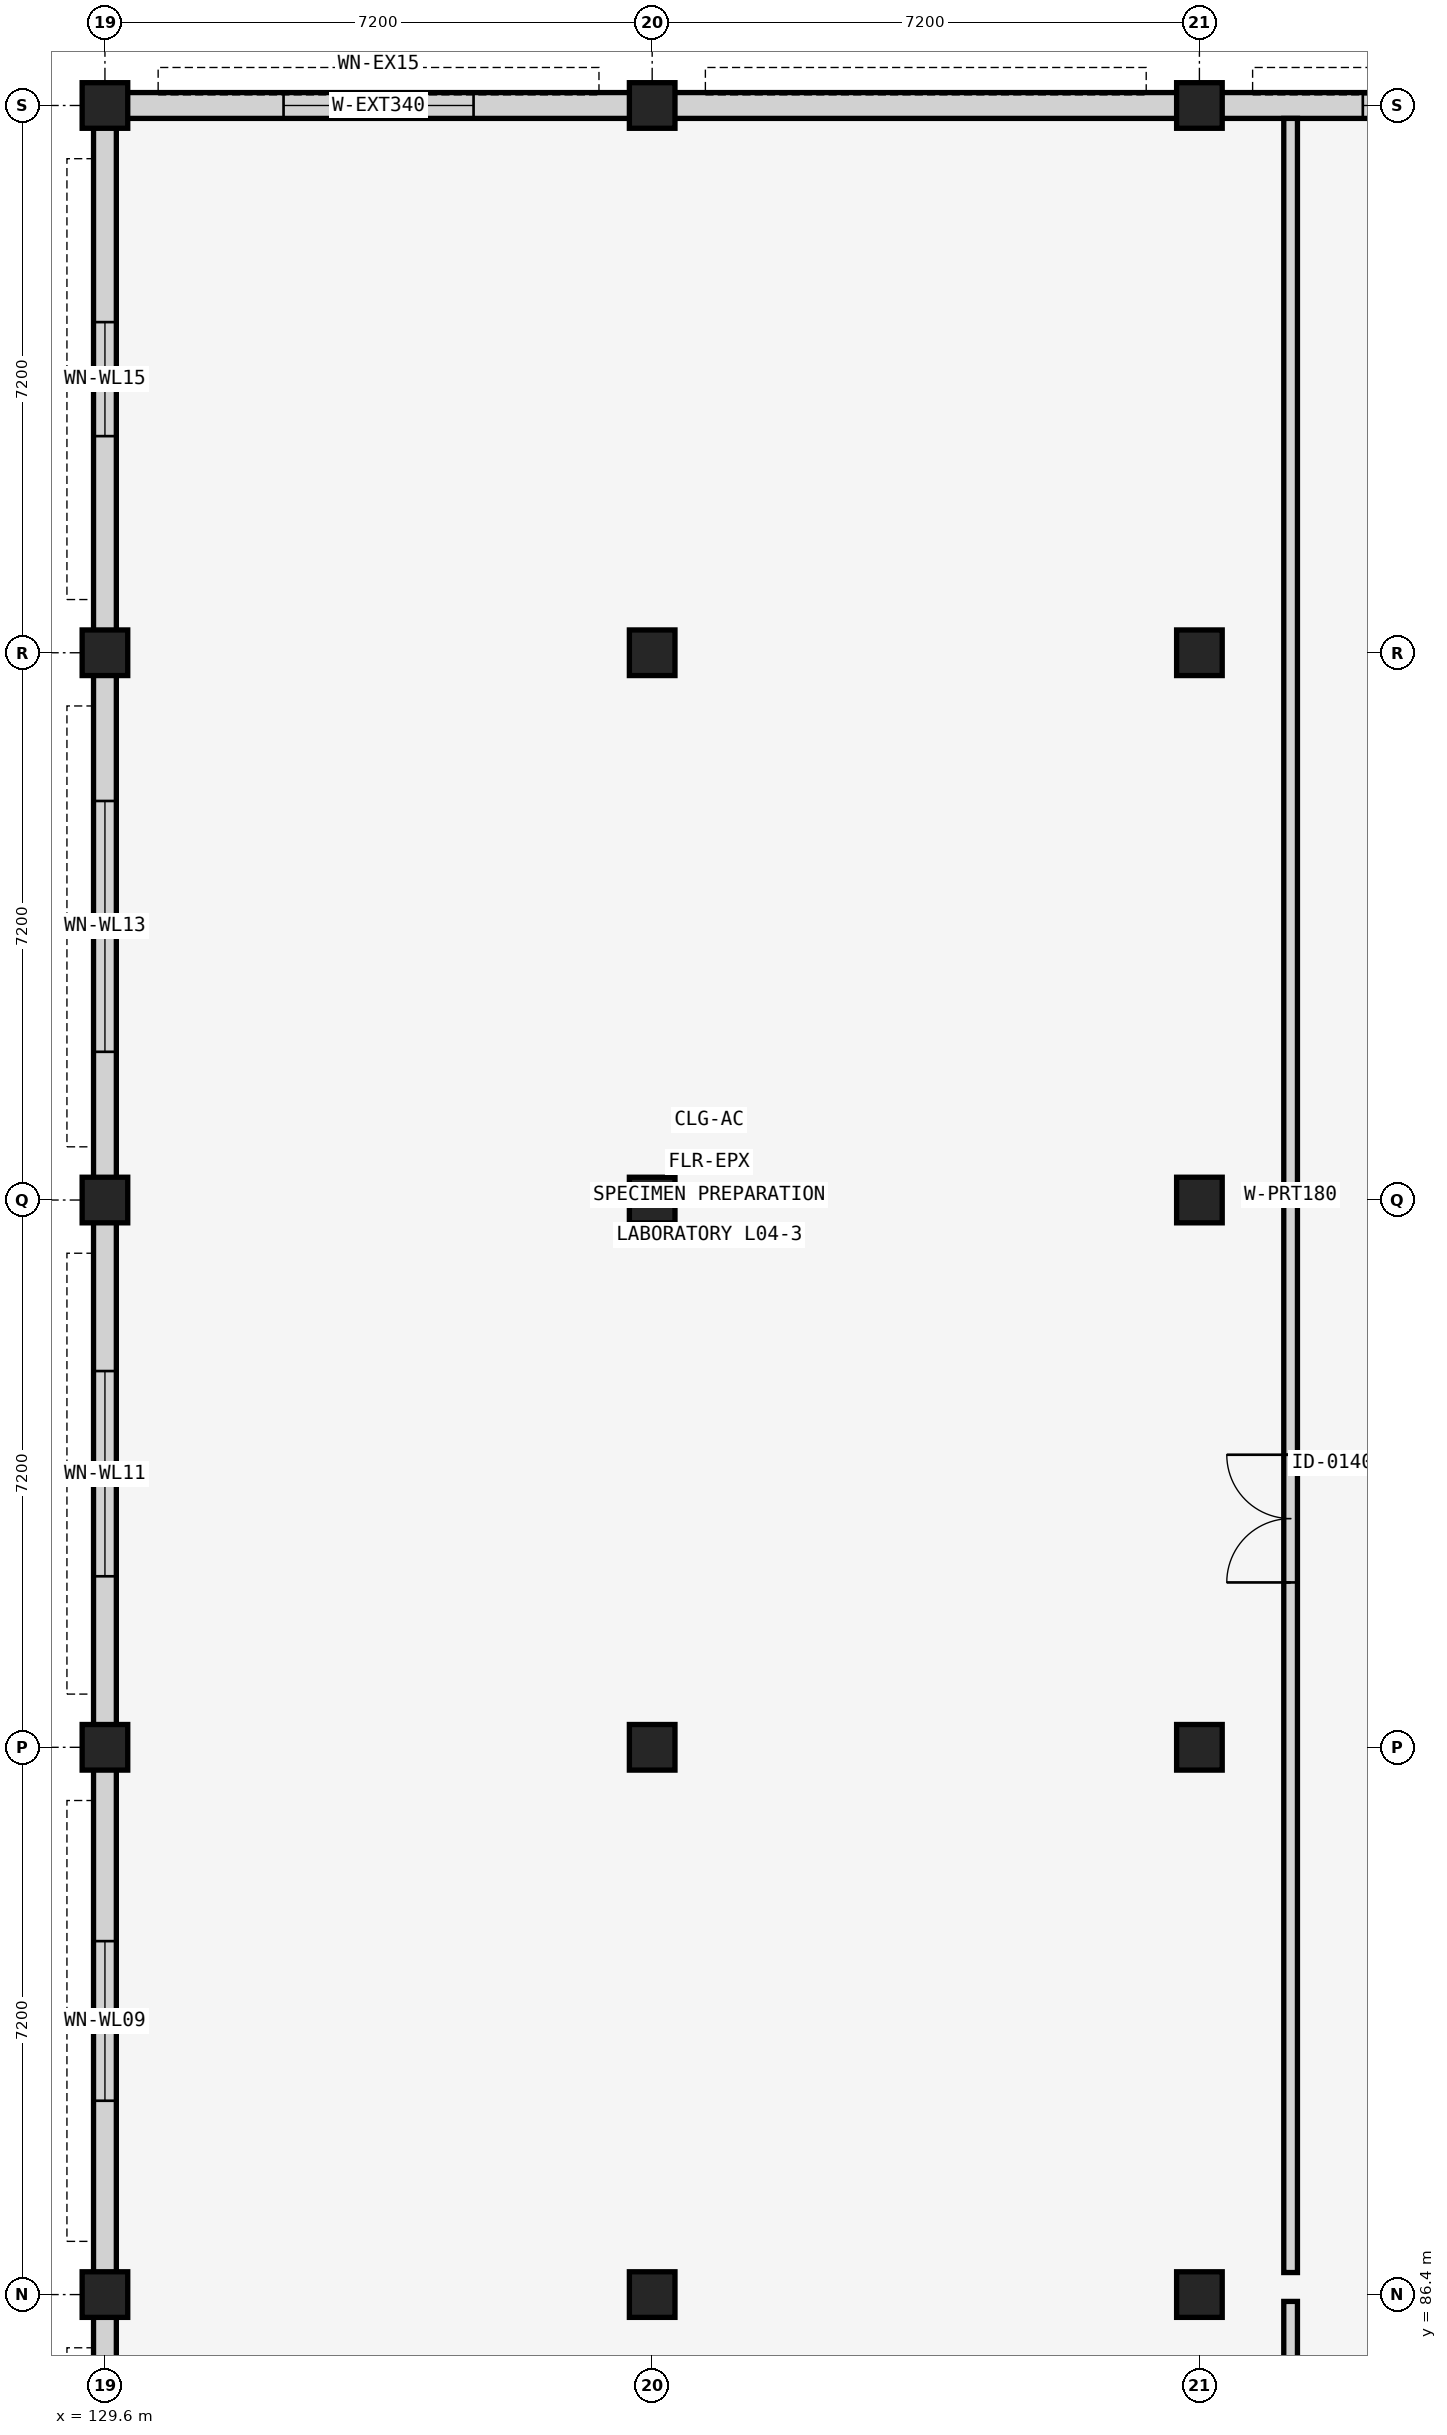
"""IFC4 building model, lengths in metres.
Left out: names, types, materials, properties, quantities, classifications, styles, units other than length and angle.
Written with IfcOpenShell. Run it as: python <this file> out.ifc"""

import sys

from ifc_helpers import new_model, si_unit, direction, frame, frame_2d, origin, origin_2d, place, context, subcontext, project, spatial, rectangle, extrude, element, fill, save


model = new_model("IFC4")
c1 = context("Model", 3, precision=1e-05, world=origin(), true_north=direction((0.0, 1.0)))
c2 = subcontext(c1, "Body", "Model", "MODEL_VIEW")
j1 = project(units=[si_unit("LENGTHUNIT", "METRE"), si_unit("PLANEANGLEUNIT", "RADIAN")], contexts=[c1])
p1 = place(None, origin())
s1 = spatial("IfcSite", under=j1, at=p1, CompositionType="ELEMENT")
p2 = place(p1, origin())
s2 = spatial("IfcBuilding", under=s1, at=p2, CompositionType="ELEMENT")
p3 = place(p2, frame((0.0, 0.0, 17.28)))
s3 = spatial("IfcBuildingStorey", under=s2, at=p3, CompositionType="ELEMENT", Elevation=17.28)
for number, where, z_axis, x_axis in (
    (1, (129.6, 86.4, 0.0), (0.0, 0.0, 1.0), (1.0, 0.0, 0.0)),
    (2, (129.6, 93.6, 0.0), (0.0, 0.0, 1.0), (1.0, 0.0, 0.0)),
    (3, (129.6, 100.8, 0.0), (0.0, 0.0, 1.0), (1.0, 0.0, 0.0)),
    (4, (129.6, 108.0, 0.0), (0.0, 0.0, 1.0), (1.0, 0.0, 0.0)),
    (5, (129.6, 115.2, 0.0), (0.0, 0.0, 1.0), (1.0, 0.0, 0.0)),
    (6, (136.8, 86.4, 0.0), (0.0, 0.0, 1.0), (1.0, 0.0, 0.0)),
    (7, (136.8, 93.6, 0.0), (0.0, 0.0, 1.0), (1.0, 0.0, 0.0)),
    (8, (136.8, 100.8, 0.0), (0.0, 0.0, 1.0), (1.0, 0.0, 0.0)),
    (9, (136.8, 108.0, 0.0), (0.0, 0.0, 1.0), (1.0, 0.0, 0.0)),
    (10, (136.8, 115.2, 0.0), (0.0, 0.0, 1.0), (1.0, 0.0, 0.0)),
    (11, (144.0, 86.4, 0.0), (0.0, 0.0, 1.0), (1.0, 0.0, 0.0)),
    (12, (144.0, 93.6, 0.0), (0.0, 0.0, 1.0), (1.0, 0.0, 0.0)),
    (13, (144.0, 100.8, 0.0), (0.0, 0.0, 1.0), (1.0, 0.0, 0.0)),
    (14, (144.0, 108.0, 0.0), (0.0, 0.0, 1.0), (1.0, 0.0, 0.0)),
    (15, (144.0, 115.2, 0.0), (0.0, 0.0, 1.0), (1.0, 0.0, 0.0)),
):
    element("IfcColumn", number, at=place(p3, frame(where, z_axis=z_axis, x_axis=x_axis)), inside=s3, PredefinedType="COLUMN", context=c2, shape_type="SweptSolid", body=[
        extrude(rectangle(XDim=0.6, YDim=0.6, at=origin_2d()), origin(), (0.0, 0.0, 1.0), 4.16),
    ])
p4 = place(p3, frame((129.89, 115.2, 0.0), z_axis=(0.0, 0.0, 1.0), x_axis=(1.0, 0.0, 0.0)))
e16 = element("IfcWall", 16, at=p4, inside=s3, PredefinedType="SOLIDWALL", context=c2, shape_type="SweptSolid", body=[
    extrude(rectangle(XDim=6.62, YDim=0.34, at=frame_2d((3.31, 0.0))), origin(), (0.0, 0.0, 1.0), 3.21),
])
p5 = place(p4, frame((2.06, 0.0, 0.95)))
e17 = element("IfcOpeningElement", 17, at=p5, cuts=e16, PredefinedType="OPENING", context=c2, shape_type="SweptSolid", body=[
    extrude(rectangle(XDim=2.5, YDim=1.6, at=frame_2d((1.25, 0.8))), frame((0.0, 0.18, 0.0), z_axis=(0.0, -1.0, 0.0), x_axis=(1.0, 0.0, 0.0)), (0.0, 0.0, 1.0), 0.36),
])
p6 = place(p3, frame((137.09, 115.2, 0.0), z_axis=(0.0, 0.0, 1.0), x_axis=(1.0, 0.0, 0.0)))
e18 = element("IfcWall", 18, at=p6, inside=s3, PredefinedType="SOLIDWALL", context=c2, shape_type="SweptSolid", body=[
    extrude(rectangle(XDim=6.62, YDim=0.34, at=frame_2d((3.31, 0.0))), origin(), (0.0, 0.0, 1.0), 3.21),
])
p7 = place(p3, frame((144.29, 115.2, 0.0), z_axis=(0.0, 0.0, 1.0), x_axis=(1.0, 0.0, 0.0)))
e19 = element("IfcWall", 19, at=p7, inside=s3, PredefinedType="SOLIDWALL", context=c2, shape_type="SweptSolid", body=[
    extrude(rectangle(XDim=6.62, YDim=0.34, at=frame_2d((3.31, 0.0))), origin(), (0.0, 0.0, 1.0), 3.21),
])
p8 = place(p7, frame((1.86, 0.0, 0.95)))
e20 = element("IfcOpeningElement", 20, at=p8, cuts=e19, PredefinedType="OPENING", context=c2, shape_type="SweptSolid", body=[
    extrude(rectangle(XDim=2.9, YDim=1.75, at=frame_2d((1.45, 0.875))), frame((0.0, 0.18, 0.0), z_axis=(0.0, -1.0, 0.0), x_axis=(1.0, 0.0, 0.0)), (0.0, 0.0, 1.0), 0.36),
])
p9 = place(p3, frame((129.6, 79.49, 0.0), z_axis=(0.0, 0.0, 1.0), x_axis=(0.0, 1.0, 0.0)))
e21 = element("IfcWall", 21, at=p9, inside=s3, PredefinedType="SOLIDWALL", context=c2, shape_type="SweptSolid", body=[
    extrude(rectangle(XDim=6.62, YDim=0.3, at=frame_2d((3.31, 0.0))), origin(), (0.0, 0.0, 1.0), 3.16),
])
p10 = place(p9, frame((1.51, 0.0, 0.9)))
e22 = element("IfcOpeningElement", 22, at=p10, cuts=e21, PredefinedType="OPENING", context=c2, shape_type="SweptSolid", body=[
    extrude(rectangle(XDim=3.6, YDim=2.1, at=frame_2d((1.8, 1.05))), frame((0.0, 0.16, 0.0), z_axis=(0.0, -1.0, 0.0), x_axis=(1.0, 0.0, 0.0)), (0.0, 0.0, 1.0), 0.32),
])
p11 = place(p3, frame((129.6, 86.69, 0.0), z_axis=(0.0, 0.0, 1.0), x_axis=(0.0, 1.0, 0.0)))
e23 = element("IfcWall", 23, at=p11, inside=s3, PredefinedType="SOLIDWALL", context=c2, shape_type="SweptSolid", body=[
    extrude(rectangle(XDim=6.62, YDim=0.3, at=frame_2d((3.31, 0.0))), origin(), (0.0, 0.0, 1.0), 3.16),
])
p12 = place(p11, frame((2.26, 0.0, 0.95)))
e24 = element("IfcOpeningElement", 24, at=p12, cuts=e23, PredefinedType="OPENING", context=c2, shape_type="SweptSolid", body=[
    extrude(rectangle(XDim=2.1, YDim=1.8, at=frame_2d((1.05, 0.9))), frame((0.0, 0.16, 0.0), z_axis=(0.0, -1.0, 0.0), x_axis=(1.0, 0.0, 0.0)), (0.0, 0.0, 1.0), 0.32),
])
p13 = place(p3, frame((129.6, 93.89, 0.0), z_axis=(0.0, 0.0, 1.0), x_axis=(0.0, 1.0, 0.0)))
e25 = element("IfcWall", 25, at=p13, inside=s3, PredefinedType="SOLIDWALL", context=c2, shape_type="SweptSolid", body=[
    extrude(rectangle(XDim=6.62, YDim=0.3, at=frame_2d((3.31, 0.0))), origin(), (0.0, 0.0, 1.0), 3.16),
])
p14 = place(p13, frame((1.96, 0.0, 0.95)))
e26 = element("IfcOpeningElement", 26, at=p14, cuts=e25, PredefinedType="OPENING", context=c2, shape_type="SweptSolid", body=[
    extrude(rectangle(XDim=2.7, YDim=1.8, at=frame_2d((1.35, 0.9))), frame((0.0, 0.16, 0.0), z_axis=(0.0, -1.0, 0.0), x_axis=(1.0, 0.0, 0.0)), (0.0, 0.0, 1.0), 0.32),
])
p15 = place(p3, frame((129.6, 101.09, 0.0), z_axis=(0.0, 0.0, 1.0), x_axis=(0.0, 1.0, 0.0)))
e27 = element("IfcWall", 27, at=p15, inside=s3, PredefinedType="SOLIDWALL", context=c2, shape_type="SweptSolid", body=[
    extrude(rectangle(XDim=6.62, YDim=0.3, at=frame_2d((3.31, 0.0))), origin(), (0.0, 0.0, 1.0), 3.16),
])
p16 = place(p15, frame((1.66, 0.0, 0.95)))
e28 = element("IfcOpeningElement", 28, at=p16, cuts=e27, PredefinedType="OPENING", context=c2, shape_type="SweptSolid", body=[
    extrude(rectangle(XDim=3.3, YDim=1.8, at=frame_2d((1.65, 0.9))), frame((0.0, 0.16, 0.0), z_axis=(0.0, -1.0, 0.0), x_axis=(1.0, 0.0, 0.0)), (0.0, 0.0, 1.0), 0.32),
])
p17 = place(p3, frame((129.6, 108.29, 0.0), z_axis=(0.0, 0.0, 1.0), x_axis=(0.0, 1.0, 0.0)))
e29 = element("IfcWall", 29, at=p17, inside=s3, PredefinedType="SOLIDWALL", context=c2, shape_type="SweptSolid", body=[
    extrude(rectangle(XDim=6.62, YDim=0.3, at=frame_2d((3.31, 0.0))), origin(), (0.0, 0.0, 1.0), 3.16),
])
p18 = place(p17, frame((2.56, 0.0, 0.95)))
e30 = element("IfcOpeningElement", 30, at=p18, cuts=e29, PredefinedType="OPENING", context=c2, shape_type="SweptSolid", body=[
    extrude(rectangle(XDim=1.5, YDim=1.8, at=frame_2d((0.75, 0.9))), frame((0.0, 0.16, 0.0), z_axis=(0.0, -1.0, 0.0), x_axis=(1.0, 0.0, 0.0)), (0.0, 0.0, 1.0), 0.32),
])
p19 = place(p3, frame((145.2, 57.89, 0.0), z_axis=(0.0, 0.0, 1.0), x_axis=(0.0, 1.0, 0.0)))
e31 = element("IfcWall", 31, at=p19, inside=s3, PredefinedType="PARTITIONING", context=c2, shape_type="SweptSolid", body=[
    extrude(rectangle(XDim=28.42, YDim=0.18, at=frame_2d((14.21, 0.0))), origin(), (0.0, 0.0, 1.0), 3.16),
])
p20 = place(p19, frame((9.132, 0.0, 0.0)))
e32 = element("IfcOpeningElement", 32, at=p20, cuts=e31, PredefinedType="OPENING", context=c2, shape_type="SweptSolid", body=[
    extrude(rectangle(XDim=1.63, YDim=2.22, at=frame_2d((0.815, 1.11))), frame((0.0, 0.1, 0.0), z_axis=(0.0, -1.0, 0.0), x_axis=(1.0, 0.0, 0.0)), (0.0, 0.0, 1.0), 0.2),
])
p21 = place(p3, frame((145.2, 86.69, 0.0), z_axis=(0.0, 0.0, 1.0), x_axis=(0.0, 1.0, 0.0)))
e33 = element("IfcWall", 33, at=p21, inside=s3, PredefinedType="PARTITIONING", context=c2, shape_type="SweptSolid", body=[
    extrude(rectangle(XDim=28.34, YDim=0.18, at=frame_2d((14.17, 0.0))), origin(), (0.0, 0.0, 1.0), 3.16),
])
p22 = place(p21, frame((9.079, 0.0, 0.0)))
e34 = element("IfcOpeningElement", 34, at=p22, cuts=e33, PredefinedType="OPENING", context=c2, shape_type="SweptSolid", body=[
    extrude(rectangle(XDim=1.68, YDim=2.22, at=frame_2d((0.84, 1.11))), frame((0.0, 0.1, 0.0), z_axis=(0.0, -1.0, 0.0), x_axis=(1.0, 0.0, 0.0)), (0.0, 0.0, 1.0), 0.2),
])
p23 = place(p5, origin())
e35 = element("IfcWindow", 35, at=p23, inside=s3, PartitioningType="SINGLE_PANEL", PredefinedType="WINDOW", context=c2, shape_type="SweptSolid", body=[
    extrude(rectangle(XDim=2.5, YDim=1.6, at=frame_2d((1.25, 0.8))), frame((0.0, 0.03, 0.0), z_axis=(0.0, -1.0, 0.0), x_axis=(1.0, 0.0, 0.0)), (0.0, 0.0, 1.0), 0.06),
])
fill(e17, e35)
p24 = place(p8, origin())
e36 = element("IfcWindow", 36, at=p24, inside=s3, PartitioningType="SINGLE_PANEL", PredefinedType="WINDOW", context=c2, shape_type="SweptSolid", body=[
    extrude(rectangle(XDim=2.9, YDim=1.75, at=frame_2d((1.45, 0.875))), frame((0.0, 0.03, 0.0), z_axis=(0.0, -1.0, 0.0), x_axis=(1.0, 0.0, 0.0)), (0.0, 0.0, 1.0), 0.06),
])
fill(e20, e36)
p25 = place(p12, origin())
e37 = element("IfcWindow", 37, at=p25, inside=s3, PartitioningType="SINGLE_PANEL", PredefinedType="WINDOW", context=c2, shape_type="SweptSolid", body=[
    extrude(rectangle(XDim=2.1, YDim=1.8, at=frame_2d((1.05, 0.9))), frame((0.0, 0.03, 0.0), z_axis=(0.0, -1.0, 0.0), x_axis=(1.0, 0.0, 0.0)), (0.0, 0.0, 1.0), 0.06),
])
fill(e24, e37)
p26 = place(p14, origin())
e38 = element("IfcWindow", 38, at=p26, inside=s3, PartitioningType="SINGLE_PANEL", PredefinedType="WINDOW", context=c2, shape_type="SweptSolid", body=[
    extrude(rectangle(XDim=2.7, YDim=1.8, at=frame_2d((1.35, 0.9))), frame((0.0, 0.03, 0.0), z_axis=(0.0, -1.0, 0.0), x_axis=(1.0, 0.0, 0.0)), (0.0, 0.0, 1.0), 0.06),
])
fill(e26, e38)
p27 = place(p16, origin())
e39 = element("IfcWindow", 39, at=p27, inside=s3, PartitioningType="SINGLE_PANEL", PredefinedType="WINDOW", context=c2, shape_type="SweptSolid", body=[
    extrude(rectangle(XDim=3.3, YDim=1.8, at=frame_2d((1.65, 0.9))), frame((0.0, 0.03, 0.0), z_axis=(0.0, -1.0, 0.0), x_axis=(1.0, 0.0, 0.0)), (0.0, 0.0, 1.0), 0.06),
])
fill(e28, e39)
p28 = place(p18, origin())
e40 = element("IfcWindow", 40, at=p28, inside=s3, PartitioningType="SINGLE_PANEL", PredefinedType="WINDOW", context=c2, shape_type="SweptSolid", body=[
    extrude(rectangle(XDim=1.5, YDim=1.8, at=frame_2d((0.75, 0.9))), frame((0.0, 0.03, 0.0), z_axis=(0.0, -1.0, 0.0), x_axis=(1.0, 0.0, 0.0)), (0.0, 0.0, 1.0), 0.06),
])
fill(e30, e40)
p29 = place(p22, origin())
e41 = element("IfcDoor", 41, at=p29, inside=s3, OperationType="DOUBLE_DOOR_SINGLE_SWING", PredefinedType="DOOR", context=c2, shape_type="SweptSolid", body=[
    extrude(rectangle(XDim=1.68, YDim=2.22, at=frame_2d((0.84, 1.11))), frame((0.0, 0.025, 0.0), z_axis=(0.0, -1.0, 0.0), x_axis=(1.0, 0.0, 0.0)), (0.0, 0.0, 1.0), 0.05),
])
fill(e34, e41)
save(model, sys.argv[1])
